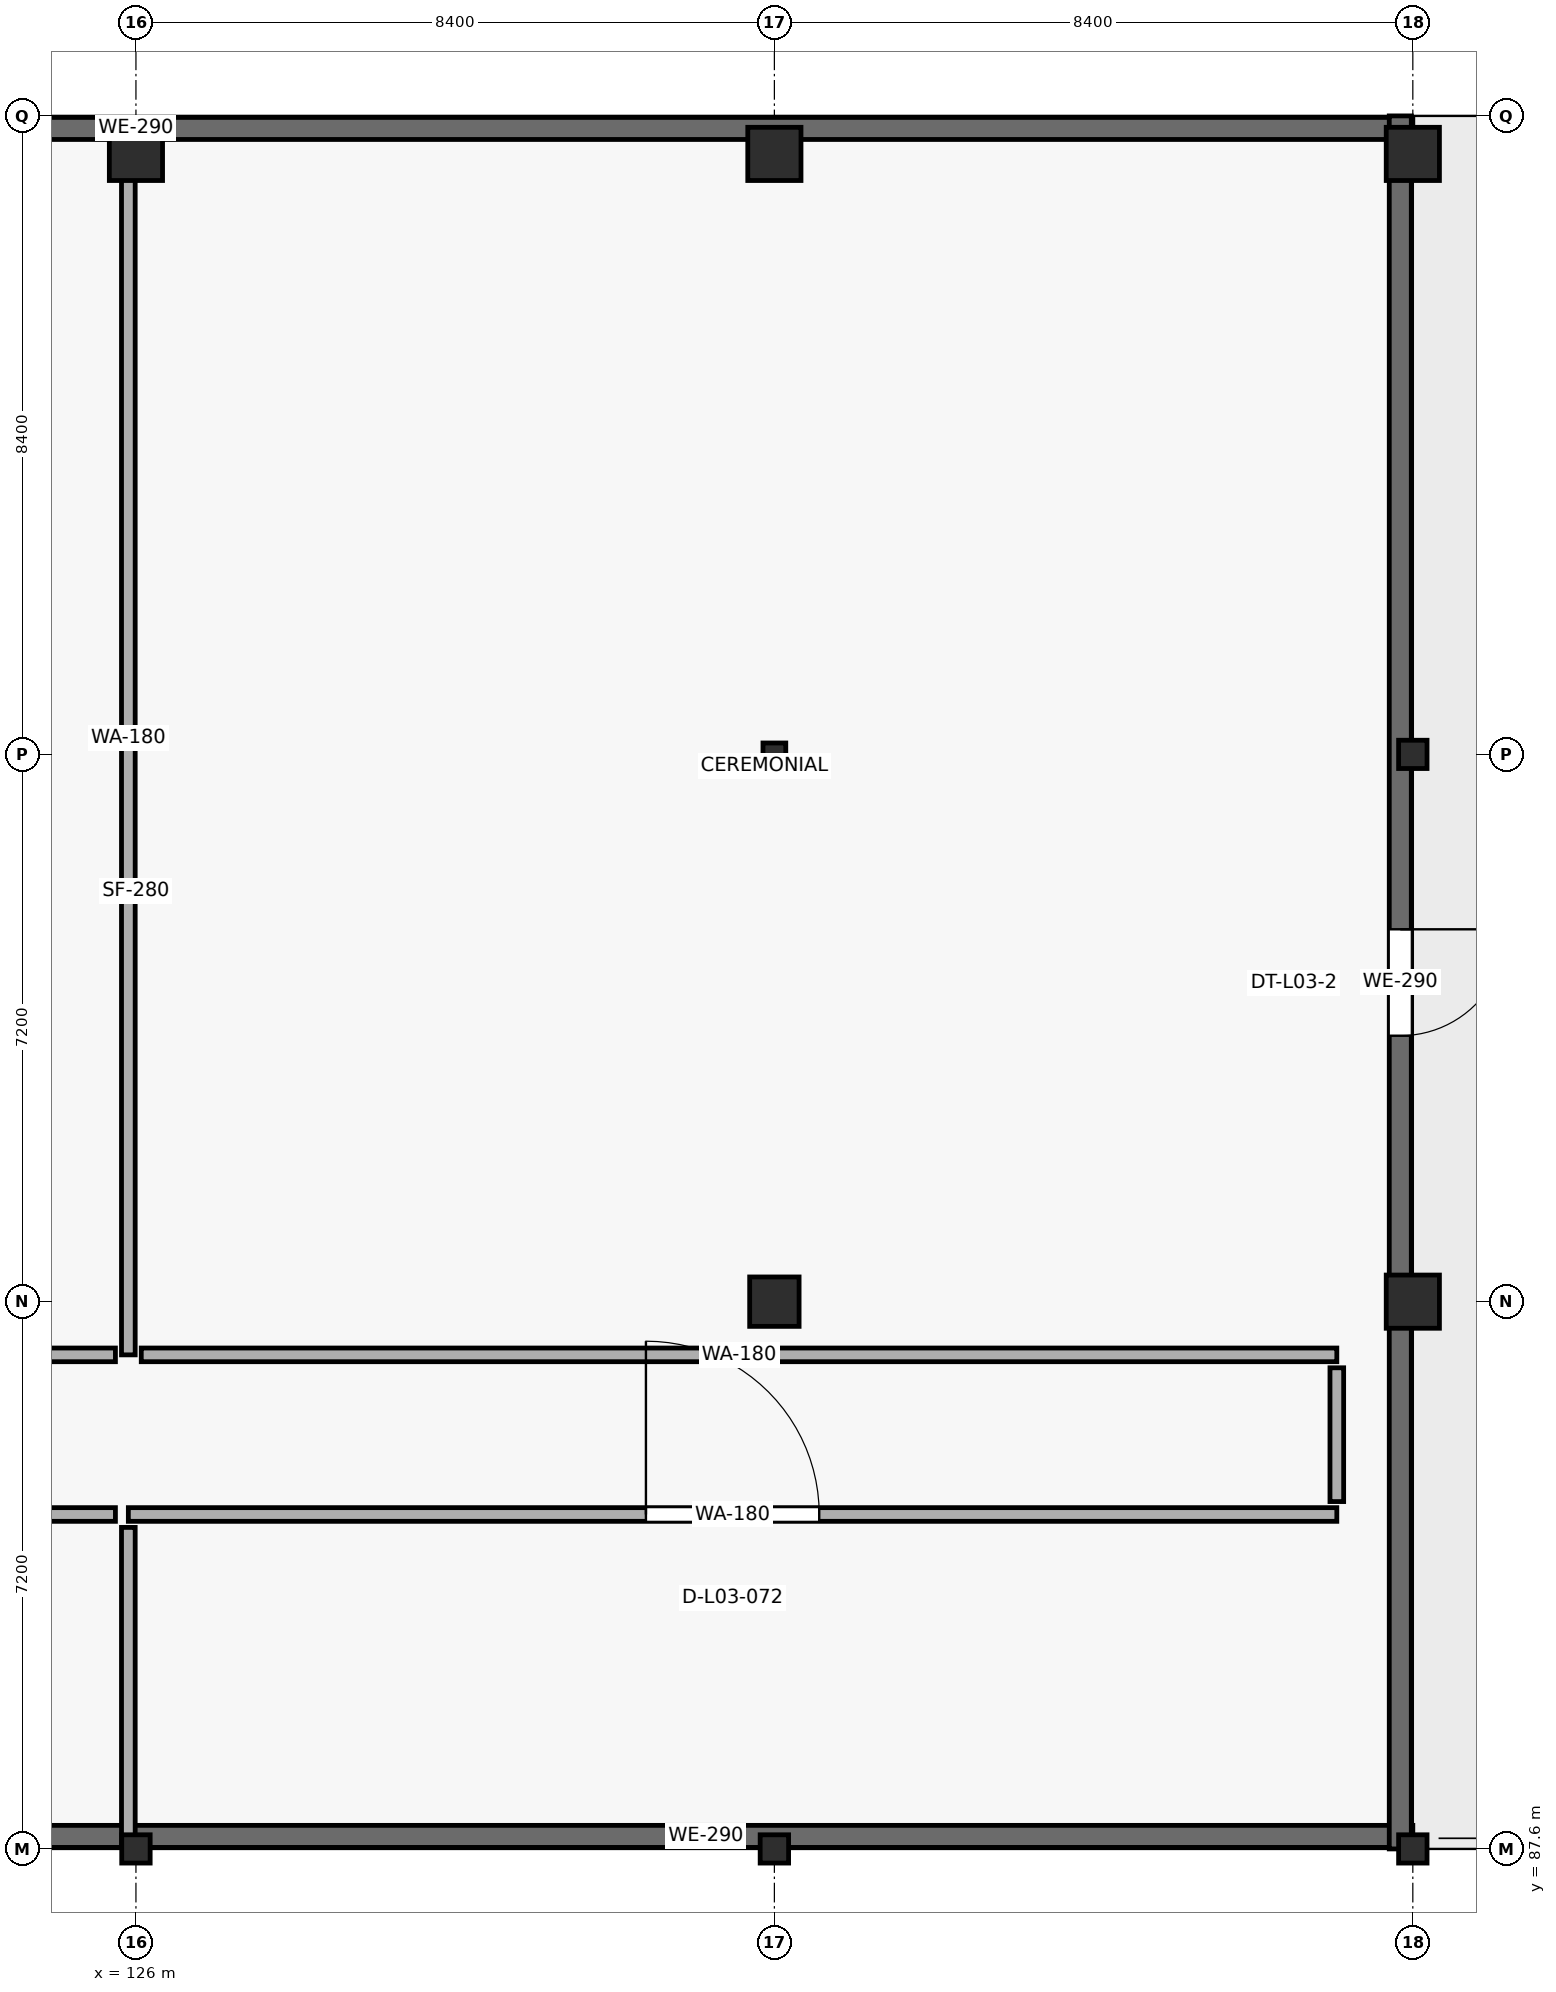
"""IFC4 building model, lengths in metres.
Left out: names, types, materials, properties, quantities, classifications, styles, units other than length and angle.
Written with IfcOpenShell. Run it as: python <this file> out.ifc"""

import sys

from ifc_helpers import new_model, si_unit, direction, frame, frame_2d, origin, origin_2d, place, context, subcontext, project, spatial, rectangle, hollow_rectangle, i_section, extrude, element, fill, save


model = new_model("IFC4")
c1 = context("Model", 3, precision=1e-05, world=origin(), true_north=direction((0.0, 1.0)))
c2 = subcontext(c1, "Body", "Model", "MODEL_VIEW")
j1 = project(units=[si_unit("LENGTHUNIT", "METRE"), si_unit("PLANEANGLEUNIT", "RADIAN")], contexts=[c1])
p1 = place(None, origin())
s1 = spatial("IfcSite", under=j1, at=p1, CompositionType="ELEMENT")
p2 = place(p1, origin())
s2 = spatial("IfcBuilding", under=s1, at=p2, CompositionType="ELEMENT")
p3 = place(p2, frame((0.0, 0.0, 10.2)))
s3 = spatial("IfcBuildingStorey", under=s2, at=p3, CompositionType="ELEMENT", Elevation=10.2)
p4 = place(p3, frame((126.0, 87.6, 0.0), z_axis=(0.0, 0.0, 1.0), x_axis=(1.0, 0.0, 0.0)))
e1 = element("IfcColumn", 1, at=p4, inside=s3, PredefinedType="COLUMN", context=c2, shape_type="SweptSolid", body=[
    extrude(i_section(OverallWidth=0.374, OverallDepth=0.372, WebThickness=0.016, FlangeThickness=0.026, at=origin_2d()), origin(), (0.0, 0.0, 1.0), 5.1),
])
p5 = place(p3, frame((126.0, 109.9, 0.0), z_axis=(0.0, 0.0, 1.0), x_axis=(1.0, 0.0, 0.0)))
e2 = element("IfcColumn", 2, at=p5, inside=s3, PredefinedType="COLUMN", context=c2, shape_type="SweptSolid", body=[
    extrude(rectangle(XDim=0.7, YDim=0.7, at=origin_2d()), origin(), (0.0, 0.0, 1.0), 5.1),
])
p6 = place(p3, frame((134.4, 87.6, 0.0), z_axis=(0.0, 0.0, 1.0), x_axis=(1.0, 0.0, 0.0)))
e3 = element("IfcColumn", 3, at=p6, inside=s3, PredefinedType="COLUMN", context=c2, shape_type="SweptSolid", body=[
    extrude(i_section(OverallWidth=0.374, OverallDepth=0.372, WebThickness=0.016, FlangeThickness=0.026, at=origin_2d()), origin(), (0.0, 0.0, 1.0), 5.1),
])
p7 = place(p3, frame((134.4, 94.8, 0.0), z_axis=(0.0, 0.0, 1.0), x_axis=(1.0, 0.0, 0.0)))
e4 = element("IfcColumn", 4, at=p7, inside=s3, PredefinedType="COLUMN", context=c2, shape_type="SweptSolid", body=[
    extrude(rectangle(XDim=0.65, YDim=0.65, at=origin_2d()), origin(), (0.0, 0.0, 1.0), 5.1),
])
p8 = place(p3, frame((134.4, 102.0, 0.0), z_axis=(0.0, 0.0, 1.0), x_axis=(1.0, 0.0, 0.0)))
e5 = element("IfcColumn", 5, at=p8, inside=s3, PredefinedType="COLUMN", context=c2, shape_type="SweptSolid", body=[
    extrude(hollow_rectangle(XDim=0.3, YDim=0.3, WallThickness=0.012, at=origin_2d()), origin(), (0.0, 0.0, 1.0), 5.1),
])
p9 = place(p3, frame((134.4, 109.9, 0.0), z_axis=(0.0, 0.0, 1.0), x_axis=(1.0, 0.0, 0.0)))
e6 = element("IfcColumn", 6, at=p9, inside=s3, PredefinedType="COLUMN", context=c2, shape_type="SweptSolid", body=[
    extrude(rectangle(XDim=0.7, YDim=0.7, at=origin_2d()), origin(), (0.0, 0.0, 1.0), 5.1),
])
p10 = place(p3, frame((142.8, 87.6, 0.0), z_axis=(0.0, 0.0, 1.0), x_axis=(1.0, 0.0, 0.0)))
e7 = element("IfcColumn", 7, at=p10, inside=s3, PredefinedType="COLUMN", context=c2, shape_type="SweptSolid", body=[
    extrude(i_section(OverallWidth=0.374, OverallDepth=0.372, WebThickness=0.016, FlangeThickness=0.026, at=origin_2d()), origin(), (0.0, 0.0, 1.0), 5.1),
])
p11 = place(p3, frame((142.8, 94.8, 0.0), z_axis=(0.0, 0.0, 1.0), x_axis=(1.0, 0.0, 0.0)))
e8 = element("IfcColumn", 8, at=p11, inside=s3, PredefinedType="COLUMN", context=c2, shape_type="SweptSolid", body=[
    extrude(rectangle(XDim=0.7, YDim=0.7, at=origin_2d()), origin(), (0.0, 0.0, 1.0), 5.1),
])
p12 = place(p3, frame((142.8, 102.0, 0.0), z_axis=(0.0, 0.0, 1.0), x_axis=(1.0, 0.0, 0.0)))
e9 = element("IfcColumn", 9, at=p12, inside=s3, PredefinedType="COLUMN", context=c2, shape_type="SweptSolid", body=[
    extrude(i_section(OverallWidth=0.374, OverallDepth=0.372, WebThickness=0.016, FlangeThickness=0.026, at=origin_2d()), origin(), (0.0, 0.0, 1.0), 5.1),
])
p13 = place(p3, frame((142.8, 109.9, 0.0), z_axis=(0.0, 0.0, 1.0), x_axis=(1.0, 0.0, 0.0)))
e10 = element("IfcColumn", 10, at=p13, inside=s3, PredefinedType="COLUMN", context=c2, shape_type="SweptSolid", body=[
    extrude(rectangle(XDim=0.7, YDim=0.7, at=origin_2d()), origin(), (0.0, 0.0, 1.0), 5.1),
])
p14 = place(p3, frame((142.8, 87.765, 0.0), z_axis=(0.0, 0.0, 1.0), x_axis=(-1.0, 0.0, 0.0)))
e11 = element("IfcWall", 11, at=p14, inside=s3, PredefinedType="SOLIDWALL", context=c2, shape_type="SweptSolid", body=[
    extrude(rectangle(XDim=18.6, YDim=0.29, at=frame_2d((9.3, 0.0))), origin(), (0.0, 0.0, 1.0), 4.82),
])
p15 = place(p3, frame((109.2, 110.235, 0.0), z_axis=(0.0, 0.0, 1.0), x_axis=(1.0, 0.0, 0.0)))
e12 = element("IfcWall", 12, at=p15, inside=s3, PredefinedType="SOLIDWALL", context=c2, shape_type="SweptSolid", body=[
    extrude(rectangle(XDim=33.6, YDim=0.29, at=frame_2d((16.8, 0.0))), origin(), (0.0, 0.0, 1.0), 4.82),
])
p16 = place(p3, frame((142.635, 110.4, 0.0), z_axis=(0.0, 0.0, 1.0), x_axis=(0.0, -1.0, 0.0)))
e13 = element("IfcWall", 13, at=p16, inside=s3, PredefinedType="SOLIDWALL", context=c2, shape_type="SweptSolid", body=[
    extrude(rectangle(XDim=22.8, YDim=0.29, at=frame_2d((11.4, 0.0))), origin(), (0.0, 0.0, 1.0), 4.82),
])
p17 = place(p16, frame((10.701, 0.0, 0.0)))
e14 = element("IfcOpeningElement", 14, at=p17, cuts=e13, PredefinedType="OPENING", context=c2, shape_type="SweptSolid", body=[
    extrude(rectangle(XDim=1.4, YDim=2.3, at=frame_2d((0.7, 1.15))), frame((0.0, 0.155, 0.0), z_axis=(0.0, -1.0, 0.0), x_axis=(1.0, 0.0, 0.0)), (0.0, 0.0, 1.0), 0.31),
])
p18 = place(p3, frame((125.9, 110.34, 0.0), z_axis=(0.0, 0.0, 1.0), x_axis=(0.0, -1.0, 0.0)))
e15 = element("IfcWall", 15, at=p18, inside=s3, PredefinedType="PARTITIONING", context=c2, shape_type="SweptSolid", body=[
    extrude(rectangle(XDim=16.24, YDim=0.18, at=frame_2d((8.12, 0.0))), origin(), (0.0, 0.0, 1.0), 3.45),
])
p19 = place(p3, frame((125.9, 92.0, 0.0), z_axis=(0.0, 0.0, 1.0), x_axis=(1.0, 0.0, 0.0)))
e16 = element("IfcWall", 16, at=p19, inside=s3, PredefinedType="PARTITIONING", context=c2, shape_type="SweptSolid", body=[
    extrude(rectangle(XDim=15.9, YDim=0.18, at=frame_2d((7.95, 0.0))), origin(), (0.0, 0.0, 1.0), 4.82),
])
p20 = place(p19, frame((6.81, 0.0, 0.0)))
e17 = element("IfcOpeningElement", 17, at=p20, cuts=e16, PredefinedType="OPENING", context=c2, shape_type="SweptSolid", body=[
    extrude(rectangle(XDim=2.28, YDim=2.75, at=frame_2d((1.14, 1.375))), frame((0.0, 0.1, 0.0), z_axis=(0.0, -1.0, 0.0), x_axis=(1.0, 0.0, 0.0)), (0.0, 0.0, 1.0), 0.2),
])
p21 = place(p3, frame((141.8, 94.1, 0.0), z_axis=(0.0, 0.0, 1.0), x_axis=(-1.0, 0.0, 0.0)))
e18 = element("IfcWall", 18, at=p21, inside=s3, PredefinedType="PARTITIONING", context=c2, shape_type="SweptSolid", body=[
    extrude(rectangle(XDim=15.73, YDim=0.18, at=frame_2d((7.865, 0.0))), origin(), (0.0, 0.0, 1.0), 4.82),
])
p22 = place(p3, frame((125.9, 91.83, 0.0), z_axis=(0.0, 0.0, 1.0), x_axis=(0.0, -1.0, 0.0)))
e19 = element("IfcWall", 19, at=p22, inside=s3, PredefinedType="PARTITIONING", context=c2, shape_type="SweptSolid", body=[
    extrude(rectangle(XDim=4.17, YDim=0.18, at=frame_2d((2.085, 0.0))), origin(), (0.0, 0.0, 1.0), 3.45),
])
p23 = place(p3, frame((125.73, 94.1, 0.0), z_axis=(0.0, 0.0, 1.0), x_axis=(-1.0, 0.0, 0.0)))
e20 = element("IfcWall", 20, at=p23, inside=s3, PredefinedType="PARTITIONING", context=c2, shape_type="SweptSolid", body=[
    extrude(rectangle(XDim=3.06, YDim=0.18, at=frame_2d((1.53, 0.0))), origin(), (0.0, 0.0, 1.0), 4.82),
])
p24 = place(p3, frame((122.5, 92.0, 0.0), z_axis=(0.0, 0.0, 1.0), x_axis=(1.0, 0.0, 0.0)))
e21 = element("IfcWall", 21, at=p24, inside=s3, PredefinedType="PARTITIONING", context=c2, shape_type="SweptSolid", body=[
    extrude(rectangle(XDim=3.23, YDim=0.18, at=frame_2d((1.615, 0.0))), origin(), (0.0, 0.0, 1.0), 4.82),
])
p25 = place(p3, frame((141.8, 92.17, 0.0), z_axis=(0.0, 0.0, 1.0), x_axis=(0.0, 1.0, 0.0)))
e22 = element("IfcWall", 22, at=p25, inside=s3, PredefinedType="PARTITIONING", context=c2, shape_type="SweptSolid", body=[
    extrude(rectangle(XDim=1.76, YDim=0.18, at=frame_2d((0.88, 0.0))), origin(), (0.0, 0.0, 1.0), 4.82),
])
p26 = place(p17, origin())
e23 = element("IfcDoor", 23, at=p26, inside=s3, OperationType="SINGLE_SWING_LEFT", PredefinedType="DOOR", context=c2, shape_type="SweptSolid", body=[
    extrude(rectangle(XDim=1.4, YDim=2.3, at=frame_2d((0.7, 1.15))), frame((0.0, 0.025, 0.0), z_axis=(0.0, -1.0, 0.0), x_axis=(1.0, 0.0, 0.0)), (0.0, 0.0, 1.0), 0.05),
])
fill(e14, e23)
p27 = place(p20, origin())
e24 = element("IfcDoor", 24, at=p27, inside=s3, OperationType="SINGLE_SWING_LEFT", PredefinedType="DOOR", context=c2, shape_type="SweptSolid", body=[
    extrude(rectangle(XDim=2.28, YDim=2.75, at=frame_2d((1.14, 1.375))), frame((0.0, 0.025, 0.0), z_axis=(0.0, -1.0, 0.0), x_axis=(1.0, 0.0, 0.0)), (0.0, 0.0, 1.0), 0.05),
])
fill(e17, e24)
save(model, sys.argv[1])
